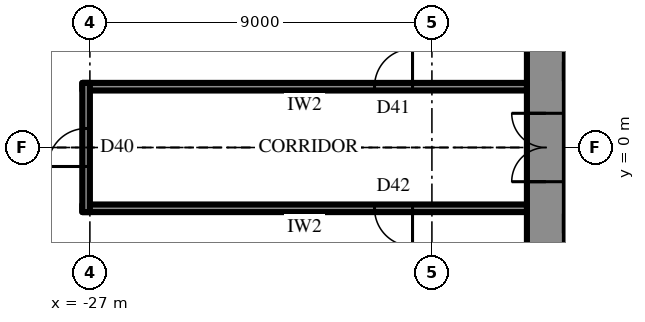
"""IFC4 building model, lengths in metres.
Left out: names, types, materials, properties, quantities, classifications, styles, units other than length and angle.
Written with IfcOpenShell. Run it as: python <this file> out.ifc"""

import sys

from ifc_helpers import new_model, si_unit, direction, frame, frame_2d, origin, place, context, subcontext, project, spatial, rectangle, extrude, element, fill, save


model = new_model("IFC4")
c1 = context("Model", 3, precision=1e-05, world=origin(), true_north=direction((0.0, 1.0)))
c2 = subcontext(c1, "Body", "Model", "MODEL_VIEW")
j1 = project(units=[si_unit("LENGTHUNIT", "METRE"), si_unit("PLANEANGLEUNIT", "RADIAN")], contexts=[c1])
p1 = place(None, origin())
s1 = spatial("IfcSite", under=j1, at=p1, CompositionType="ELEMENT")
p2 = place(p1, origin())
s2 = spatial("IfcBuilding", under=s1, at=p2, CompositionType="ELEMENT")
p3 = place(p2, frame((0.0, 0.0, 265.9)))
s3 = spatial("IfcBuildingStorey", under=s2, at=p3, CompositionType="ELEMENT", Elevation=265.9)
p4 = place(p3, frame((-15.0, 10.7, 0.0), z_axis=(0.0, 0.0, 1.0), x_axis=(0.0, -1.0, 0.0)))
e1 = element("IfcWall", 1, at=p4, inside=s3, PredefinedType="SHEAR", context=c2, shape_type="SweptSolid", body=[
    extrude(rectangle(XDim=21.4, YDim=1.0, at=frame_2d((10.7, 0.0))), origin(), (0.0, 0.0, 1.0), 4.2),
])
p5 = place(p4, frame((9.8, 0.0, 0.0)))
e2 = element("IfcOpeningElement", 2, at=p5, cuts=e1, PredefinedType="OPENING", context=c2, shape_type="SweptSolid", body=[
    extrude(rectangle(XDim=1.8, YDim=2.4, at=frame_2d((0.9, 1.2))), frame((0.0, 0.51, 0.0), z_axis=(0.0, -1.0, 0.0), x_axis=(1.0, 0.0, 0.0)), (0.0, 0.0, 1.0), 1.02),
])
p6 = place(p3, frame((-12.3, -2.0, 0.0), z_axis=(0.0, 0.0, 1.0), x_axis=(-1.0, 0.0, 0.0)))
e3 = element("IfcWall", 3, at=p6, inside=s3, PredefinedType="SHEAR", context=c2, shape_type="SweptSolid", body=[
    extrude(rectangle(XDim=2.2, YDim=0.5, at=frame_2d((1.1, 0.0))), origin(), (0.0, 0.0, 1.0), 4.2),
])
p7 = place(p6, frame((0.8, 0.0, 0.0)))
e4 = element("IfcOpeningElement", 4, at=p7, cuts=e3, PredefinedType="OPENING", context=c2, shape_type="SweptSolid", body=[
    extrude(rectangle(XDim=0.9, YDim=2.2, at=frame_2d((0.45, 1.1))), frame((0.0, 0.26, 0.0), z_axis=(0.0, -1.0, 0.0), x_axis=(1.0, 0.0, 0.0)), (0.0, 0.0, 1.0), 0.52),
])
p8 = place(p3, frame((-15.5, 1.6, 0.0), z_axis=(0.0, 0.0, 1.0), x_axis=(-1.0, 0.0, 0.0)))
e5 = element("IfcWall", 5, at=p8, inside=s3, PredefinedType="PARTITIONING", context=c2, shape_type="SweptSolid", body=[
    extrude(rectangle(XDim=11.7, YDim=0.2, at=frame_2d((5.85, 0.0))), origin(), (0.0, 0.0, 1.0), 4.0),
])
p9 = place(p8, frame((3.01, 0.0, 0.0)))
e6 = element("IfcOpeningElement", 6, at=p9, cuts=e5, PredefinedType="OPENING", context=c2, shape_type="SweptSolid", body=[
    extrude(rectangle(XDim=1.0, YDim=2.2, at=frame_2d((0.5, 1.1))), frame((0.0, 0.11, 0.0), z_axis=(0.0, -1.0, 0.0), x_axis=(1.0, 0.0, 0.0)), (0.0, 0.0, 1.0), 0.22),
])
p10 = place(p3, frame((-15.5, -1.6, 0.0), z_axis=(0.0, 0.0, 1.0), x_axis=(-1.0, 0.0, 0.0)))
e7 = element("IfcWall", 7, at=p10, inside=s3, PredefinedType="PARTITIONING", context=c2, shape_type="SweptSolid", body=[
    extrude(rectangle(XDim=11.7, YDim=0.2, at=frame_2d((5.85, 0.0))), origin(), (0.0, 0.0, 1.0), 4.0),
])
p11 = place(p10, frame((3.01, 0.0, 0.0)))
e8 = element("IfcOpeningElement", 8, at=p11, cuts=e7, PredefinedType="OPENING", context=c2, shape_type="SweptSolid", body=[
    extrude(rectangle(XDim=1.0, YDim=2.2, at=frame_2d((0.5, 1.1))), frame((0.0, 0.11, 0.0), z_axis=(0.0, -1.0, 0.0), x_axis=(1.0, 0.0, 0.0)), (0.0, 0.0, 1.0), 0.22),
])
p12 = place(p3, frame((-27.1, -1.7, 0.0), z_axis=(0.0, 0.0, 1.0), x_axis=(0.0, 1.0, 0.0)))
e9 = element("IfcWall", 9, at=p12, inside=s3, PredefinedType="PARTITIONING", context=c2, shape_type="SweptSolid", body=[
    extrude(rectangle(XDim=3.4, YDim=0.2, at=frame_2d((1.7, 0.0))), origin(), (0.0, 0.0, 1.0), 4.0),
])
p13 = place(p12, frame((1.2, 0.0, 0.0)))
e10 = element("IfcOpeningElement", 10, at=p13, cuts=e9, PredefinedType="OPENING", context=c2, shape_type="SweptSolid", body=[
    extrude(rectangle(XDim=1.0, YDim=2.2, at=frame_2d((0.5, 1.1))), frame((0.0, 0.11, 0.0), z_axis=(0.0, -1.0, 0.0), x_axis=(1.0, 0.0, 0.0)), (0.0, 0.0, 1.0), 0.22),
])
p14 = place(p5, frame((1.8, 0.0, 0.0), z_axis=(0.0, 0.0, 1.0), x_axis=(-1.0, 0.0, 0.0)))
e11 = element("IfcDoor", 11, at=p14, inside=s3, OperationType="DOUBLE_DOOR_SINGLE_SWING", PredefinedType="DOOR", context=c2, shape_type="SweptSolid", body=[
    extrude(rectangle(XDim=1.8, YDim=2.4, at=frame_2d((0.9, 1.2))), frame((0.0, 0.025, 0.0), z_axis=(0.0, -1.0, 0.0), x_axis=(1.0, 0.0, 0.0)), (0.0, 0.0, 1.0), 0.05),
])
fill(e2, e11)
p15 = place(p9, frame((1.0, 0.0, 0.0), z_axis=(0.0, 0.0, 1.0), x_axis=(-1.0, 0.0, 0.0)))
e12 = element("IfcDoor", 12, at=p15, inside=s3, OperationType="SINGLE_SWING_LEFT", PredefinedType="DOOR", context=c2, shape_type="SweptSolid", body=[
    extrude(rectangle(XDim=1.0, YDim=2.2, at=frame_2d((0.5, 1.1))), frame((0.0, 0.025, 0.0), z_axis=(0.0, -1.0, 0.0), x_axis=(1.0, 0.0, 0.0)), (0.0, 0.0, 1.0), 0.05),
])
fill(e6, e12)
p16 = place(p11, origin())
e13 = element("IfcDoor", 13, at=p16, inside=s3, OperationType="SINGLE_SWING_RIGHT", PredefinedType="DOOR", context=c2, shape_type="SweptSolid", body=[
    extrude(rectangle(XDim=1.0, YDim=2.2, at=frame_2d((0.5, 1.1))), frame((0.0, 0.025, 0.0), z_axis=(0.0, -1.0, 0.0), x_axis=(1.0, 0.0, 0.0)), (0.0, 0.0, 1.0), 0.05),
])
fill(e8, e13)
p17 = place(p13, origin())
e14 = element("IfcDoor", 14, at=p17, inside=s3, OperationType="SINGLE_SWING_RIGHT", PredefinedType="DOOR", context=c2, shape_type="SweptSolid", body=[
    extrude(rectangle(XDim=1.0, YDim=2.2, at=frame_2d((0.5, 1.1))), frame((0.0, 0.025, 0.0), z_axis=(0.0, -1.0, 0.0), x_axis=(1.0, 0.0, 0.0)), (0.0, 0.0, 1.0), 0.05),
])
fill(e10, e14)
save(model, sys.argv[1])
